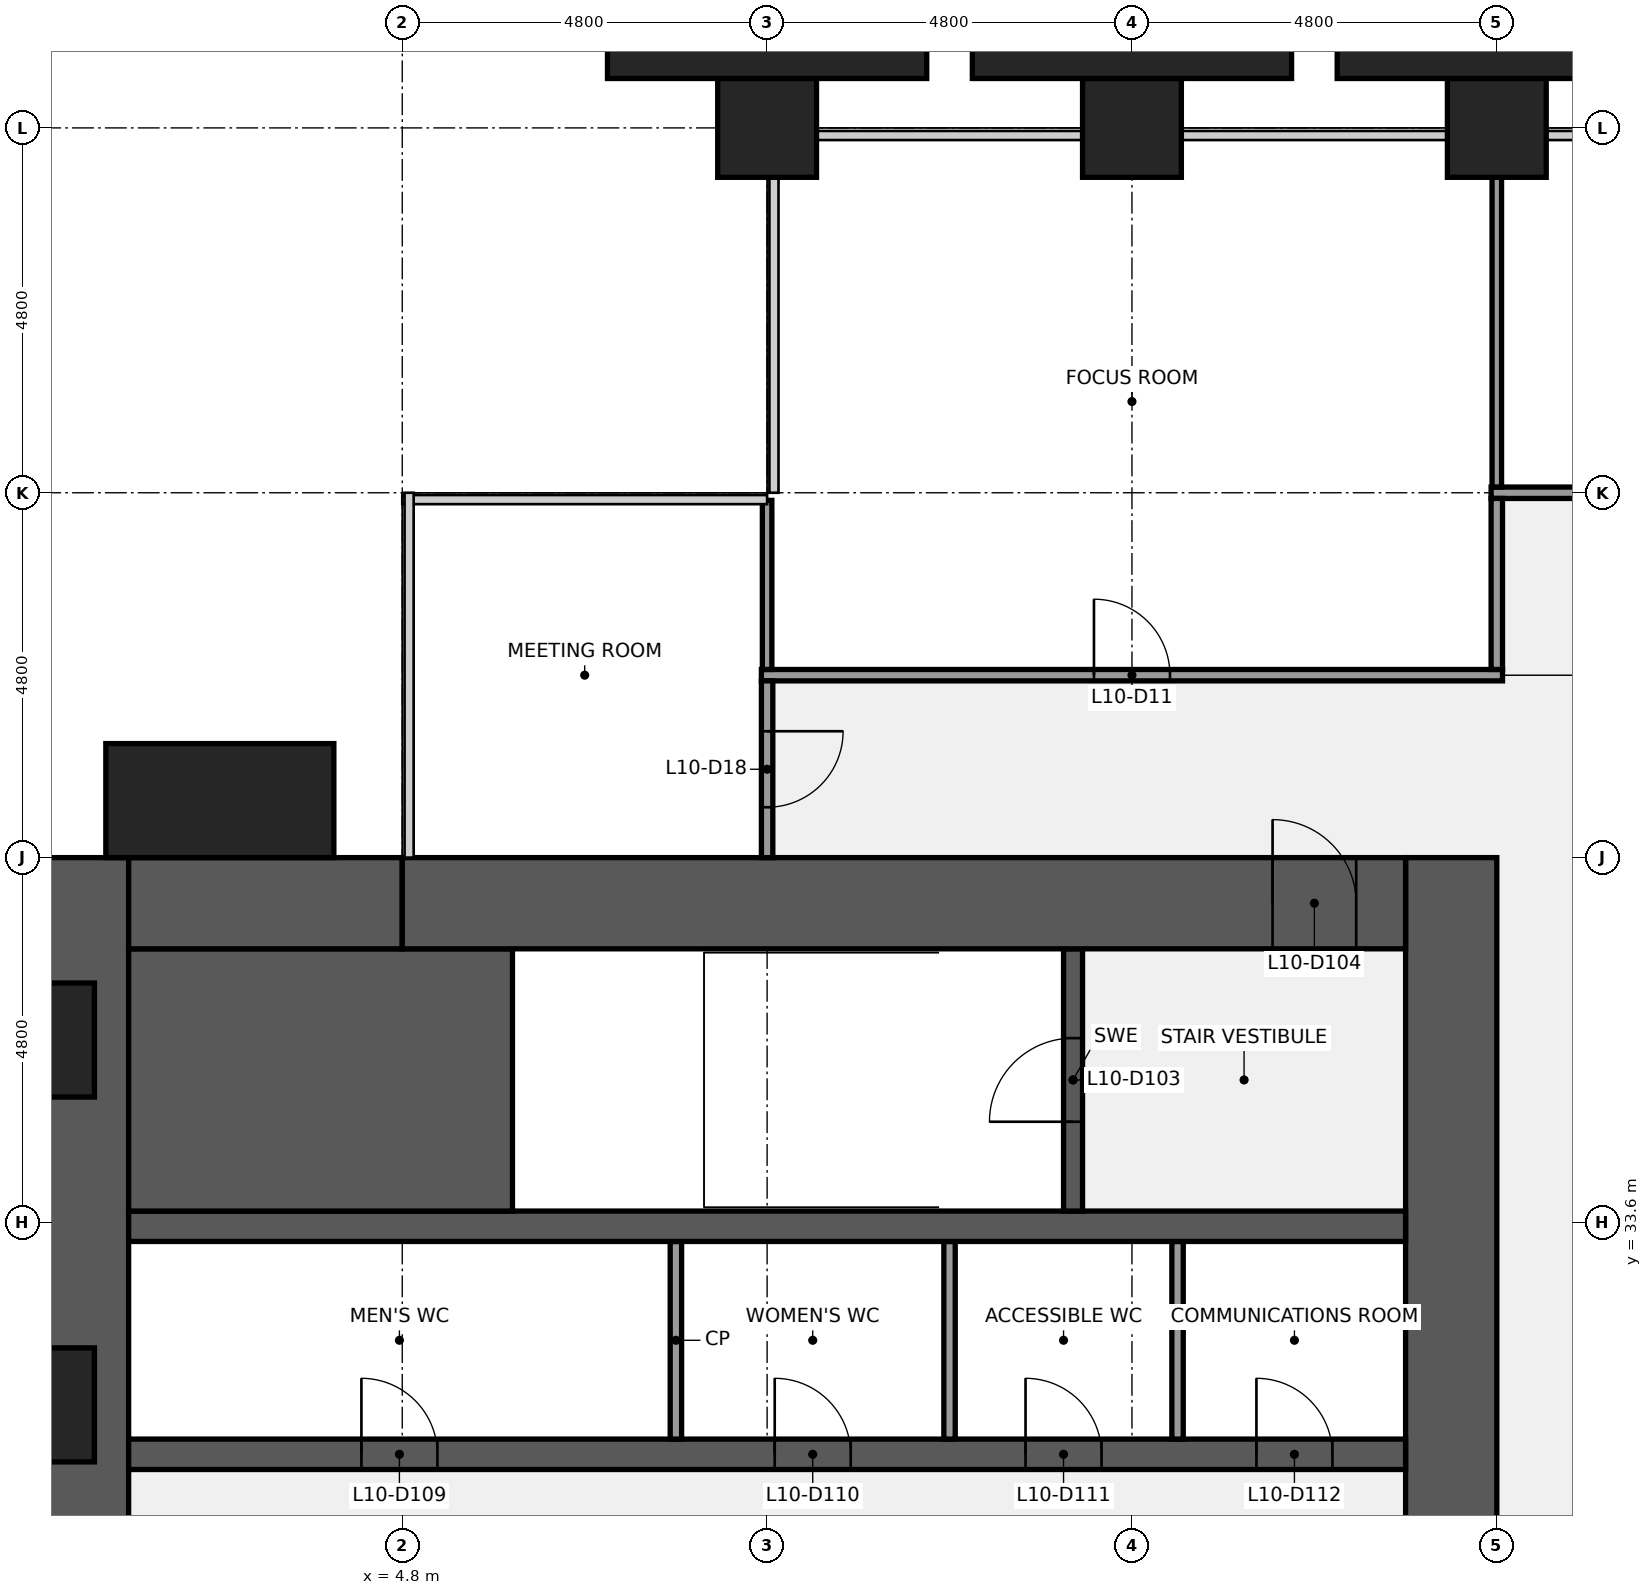
"""IFC4 building model, lengths in metres.
Left out: names, types, materials, properties, quantities, classifications, styles, units other than length and angle.
Written with IfcOpenShell. Run it as: python <this file> out.ifc"""

import sys

from ifc_helpers import new_model, si_unit, direction, frame, frame_2d, origin, origin_2d, place, context, subcontext, project, spatial, rectangle, extrude, element, fill, save


model = new_model("IFC4")
c1 = context("Model", 3, precision=1e-05, world=origin(), true_north=direction((0.0, 1.0)))
c2 = subcontext(c1, "Body", "Model", "MODEL_VIEW")
j1 = project(units=[si_unit("LENGTHUNIT", "METRE"), si_unit("PLANEANGLEUNIT", "RADIAN")], contexts=[c1])
p1 = place(None, origin())
s1 = spatial("IfcSite", under=j1, at=p1, CompositionType="ELEMENT")
p2 = place(p1, origin())
s2 = spatial("IfcBuilding", under=s1, at=p2, CompositionType="ELEMENT")
p3 = place(p2, frame((0.0, 0.0, 51.0)))
s3 = spatial("IfcBuildingStorey", under=s2, at=p3, CompositionType="ELEMENT", Elevation=51.0)
for number, where, z_axis, x_axis in (
    (1, (9.6, 48.0, 0.0), (0.0, 0.0, 1.0), (1.0, 0.0, 0.0)),
    (2, (14.4, 48.0, 0.0), (0.0, 0.0, 1.0), (1.0, 0.0, 0.0)),
    (3, (19.2, 48.0, 0.0), (0.0, 0.0, 1.0), (1.0, 0.0, 0.0)),
):
    element("IfcColumn", number, at=place(p3, frame(where, z_axis=z_axis, x_axis=x_axis)), inside=s3, PredefinedType="COLUMN", context=c2, shape_type="SweptSolid", body=[
        extrude(rectangle(XDim=1.3, YDim=1.3, at=origin_2d()), origin(), (0.0, 0.0, 1.0), 4.0),
    ])
p4 = place(p3, frame((0.6, 9.6, 0.0), z_axis=(0.0, 0.0, 1.0), x_axis=(0.0, 1.0, 0.0)))
e4 = element("IfcWall", 4, at=p4, inside=s3, PredefinedType="SHEAR", context=c2, shape_type="SweptSolid", body=[
    extrude(rectangle(XDim=28.8, YDim=1.2, at=frame_2d((14.4, 0.0))), origin(), (0.0, 0.0, 1.0), 3.84),
])
p5 = place(p4, frame((8.85, 0.0, 0.9)))
e5 = element("IfcOpeningElement", 5, at=p5, cuts=e4, PredefinedType="OPENING", context=c2, shape_type="SweptSolid", body=[
    extrude(rectangle(XDim=1.5, YDim=1.5, at=frame_2d((0.75, 0.75))), frame((0.0, 0.61, 0.0), z_axis=(0.0, -1.0, 0.0), x_axis=(1.0, 0.0, 0.0)), (0.0, 0.0, 1.0), 1.22),
])
p6 = place(p4, frame((18.45, 0.0, 0.9)))
e6 = element("IfcOpeningElement", 6, at=p6, cuts=e4, PredefinedType="OPENING", context=c2, shape_type="SweptSolid", body=[
    extrude(rectangle(XDim=1.5, YDim=1.5, at=frame_2d((0.75, 0.75))), frame((0.0, 0.61, 0.0), z_axis=(0.0, -1.0, 0.0), x_axis=(1.0, 0.0, 0.0)), (0.0, 0.0, 1.0), 1.22),
])
p7 = place(p3, frame((18.6, 38.4, 0.0), z_axis=(0.0, 0.0, 1.0), x_axis=(0.0, -1.0, 0.0)))
e7 = element("IfcWall", 7, at=p7, inside=s3, PredefinedType="SHEAR", context=c2, shape_type="SweptSolid", body=[
    extrude(rectangle(XDim=28.8, YDim=1.2, at=frame_2d((14.4, 0.0))), origin(), (0.0, 0.0, 1.0), 3.84),
])
p8 = place(p7, frame((18.3, 0.0, 0.0)))
e8 = element("IfcOpeningElement", 8, at=p8, cuts=e7, PredefinedType="OPENING", context=c2, shape_type="SweptSolid", body=[
    extrude(rectangle(XDim=1.8, YDim=2.1, at=frame_2d((0.9, 1.05))), frame((0.0, 0.61, 0.0), z_axis=(0.0, -1.0, 0.0), x_axis=(1.0, 0.0, 0.0)), (0.0, 0.0, 1.0), 1.22),
])
p9 = place(p7, frame((8.7, 0.0, 0.0)))
e9 = element("IfcOpeningElement", 9, at=p9, cuts=e7, PredefinedType="OPENING", context=c2, shape_type="SweptSolid", body=[
    extrude(rectangle(XDim=1.8, YDim=2.1, at=frame_2d((0.9, 1.05))), frame((0.0, 0.61, 0.0), z_axis=(0.0, -1.0, 0.0), x_axis=(1.0, 0.0, 0.0)), (0.0, 0.0, 1.0), 1.22),
])
p10 = place(p3, frame((1.2, 30.55, 0.0), z_axis=(0.0, 0.0, 1.0), x_axis=(1.0, 0.0, 0.0)))
e10 = element("IfcWall", 10, at=p10, inside=s3, PredefinedType="SHEAR", context=c2, shape_type="SweptSolid", body=[
    extrude(rectangle(XDim=16.8, YDim=0.4, at=frame_2d((8.4, 0.0))), origin(), (0.0, 0.0, 1.0), 3.84),
])
p11 = place(p10, frame((3.062, 0.0, 0.0)))
e11 = element("IfcOpeningElement", 11, at=p11, cuts=e10, PredefinedType="OPENING", context=c2, shape_type="SweptSolid", body=[
    extrude(rectangle(XDim=1.0, YDim=2.1, at=frame_2d((0.5, 1.05))), frame((0.0, 0.21, 0.0), z_axis=(0.0, -1.0, 0.0), x_axis=(1.0, 0.0, 0.0)), (0.0, 0.0, 1.0), 0.42),
])
p12 = place(p10, frame((8.5, 0.0, 0.0)))
e12 = element("IfcOpeningElement", 12, at=p12, cuts=e10, PredefinedType="OPENING", context=c2, shape_type="SweptSolid", body=[
    extrude(rectangle(XDim=1.0, YDim=2.1, at=frame_2d((0.5, 1.05))), frame((0.0, 0.21, 0.0), z_axis=(0.0, -1.0, 0.0), x_axis=(1.0, 0.0, 0.0)), (0.0, 0.0, 1.0), 0.42),
])
p13 = place(p10, frame((11.8, 0.0, 0.0)))
e13 = element("IfcOpeningElement", 13, at=p13, cuts=e10, PredefinedType="OPENING", context=c2, shape_type="SweptSolid", body=[
    extrude(rectangle(XDim=1.0, YDim=2.1, at=frame_2d((0.5, 1.05))), frame((0.0, 0.21, 0.0), z_axis=(0.0, -1.0, 0.0), x_axis=(1.0, 0.0, 0.0)), (0.0, 0.0, 1.0), 0.42),
])
p14 = place(p10, frame((14.837, 0.0, 0.0)))
e14 = element("IfcOpeningElement", 14, at=p14, cuts=e10, PredefinedType="OPENING", context=c2, shape_type="SweptSolid", body=[
    extrude(rectangle(XDim=1.0, YDim=2.1, at=frame_2d((0.5, 1.05))), frame((0.0, 0.21, 0.0), z_axis=(0.0, -1.0, 0.0), x_axis=(1.0, 0.0, 0.0)), (0.0, 0.0, 1.0), 0.42),
])
for number, where, z_axis, x_axis in (
    (15, (8.4, 30.75, 0.0), (0.0, 0.0, 1.0), (0.0, 1.0, 0.0)),
    (16, (12.0, 30.75, 0.0), (0.0, 0.0, 1.0), (0.0, 1.0, 0.0)),
    (17, (15.0, 30.75, 0.0), (0.0, 0.0, 1.0), (0.0, 1.0, 0.0)),
):
    element("IfcWall", number, at=place(p3, frame(where, z_axis=z_axis, x_axis=x_axis)), inside=s3, PredefinedType="PARTITIONING", context=c2, shape_type="SweptSolid", body=[
        extrude(rectangle(XDim=2.6, YDim=0.15, at=frame_2d((1.3, 0.0))), origin(), (0.0, 0.0, 1.0), 3.84),
    ])
p15 = place(p3, frame((1.2, 33.55, 0.0), z_axis=(0.0, 0.0, 1.0), x_axis=(1.0, 0.0, 0.0)))
e18 = element("IfcWall", 18, at=p15, inside=s3, PredefinedType="SHEAR", context=c2, shape_type="SweptSolid", body=[
    extrude(rectangle(XDim=16.8, YDim=0.4, at=frame_2d((8.4, 0.0))), origin(), (0.0, 0.0, 1.0), 3.84),
])
p16 = place(p3, frame((1.2, 35.475, 0.0), z_axis=(0.0, 0.0, 1.0), x_axis=(1.0, 0.0, 0.0)))
e19 = element("IfcWall", 19, at=p16, inside=s3, PredefinedType="SHEAR", context=c2, shape_type="SweptSolid", body=[
    extrude(rectangle(XDim=5.05, YDim=3.45, at=frame_2d((2.525, 0.0))), origin(), (0.0, 0.0, 1.0), 3.84),
])
p17 = place(p3, frame((13.625, 33.75, 0.0), z_axis=(0.0, 0.0, 1.0), x_axis=(0.0, 1.0, 0.0)))
e20 = element("IfcWall", 20, at=p17, inside=s3, PredefinedType="SHEAR", context=c2, shape_type="SweptSolid", body=[
    extrude(rectangle(XDim=3.45, YDim=0.25, at=frame_2d((1.725, 0.0))), origin(), (0.0, 0.0, 1.0), 3.84),
])
p18 = place(p17, frame((1.175, 0.0, 0.0)))
e21 = element("IfcOpeningElement", 21, at=p18, cuts=e20, PredefinedType="OPENING", context=c2, shape_type="SweptSolid", body=[
    extrude(rectangle(XDim=1.1, YDim=2.1, at=frame_2d((0.55, 1.05))), frame((0.0, 0.135, 0.0), z_axis=(0.0, -1.0, 0.0), x_axis=(1.0, 0.0, 0.0)), (0.0, 0.0, 1.0), 0.27),
])
p19 = place(p3, frame((1.2, 37.8, 0.0), z_axis=(0.0, 0.0, 1.0), x_axis=(1.0, 0.0, 0.0)))
e22 = element("IfcWall", 22, at=p19, inside=s3, PredefinedType="SHEAR", context=c2, shape_type="SweptSolid", body=[
    extrude(rectangle(XDim=3.6, YDim=1.2, at=frame_2d((1.8, 0.0))), origin(), (0.0, 0.0, 1.0), 3.84),
])
p20 = place(p3, frame((4.8, 37.8, 0.0), z_axis=(0.0, 0.0, 1.0), x_axis=(1.0, 0.0, 0.0)))
e23 = element("IfcWall", 23, at=p20, inside=s3, PredefinedType="SHEAR", context=c2, shape_type="SweptSolid", body=[
    extrude(rectangle(XDim=13.2, YDim=1.2, at=frame_2d((6.6, 0.0))), origin(), (0.0, 0.0, 1.0), 3.84),
])
p21 = place(p20, frame((11.45, 0.0, 0.0)))
e24 = element("IfcOpeningElement", 24, at=p21, cuts=e23, PredefinedType="OPENING", context=c2, shape_type="SweptSolid", body=[
    extrude(rectangle(XDim=1.1, YDim=2.1, at=frame_2d((0.55, 1.05))), frame((0.0, 0.61, 0.0), z_axis=(0.0, -1.0, 0.0), x_axis=(1.0, 0.0, 0.0)), (0.0, 0.0, 1.0), 1.22),
])
p22 = place(p3, frame((9.525, 40.8, 0.0), z_axis=(0.0, 0.0, 1.0), x_axis=(1.0, 0.0, 0.0)))
e25 = element("IfcWall", 25, at=p22, inside=s3, PredefinedType="PARTITIONING", context=c2, shape_type="SweptSolid", body=[
    extrude(rectangle(XDim=9.75, YDim=0.15, at=frame_2d((4.875, 0.0))), origin(), (0.0, 0.0, 1.0), 2.87),
])
p23 = place(p22, frame((4.375, 0.0, 0.0)))
e26 = element("IfcOpeningElement", 26, at=p23, cuts=e25, PredefinedType="OPENING", context=c2, shape_type="SweptSolid", body=[
    extrude(rectangle(XDim=1.0, YDim=2.1, at=frame_2d((0.5, 1.05))), frame((0.0, 0.085, 0.0), z_axis=(0.0, -1.0, 0.0), x_axis=(1.0, 0.0, 0.0)), (0.0, 0.0, 1.0), 0.17),
])
p24 = place(p3, frame((19.125, 43.2, 0.0), z_axis=(0.0, 0.0, 1.0), x_axis=(1.0, 0.0, 0.0)))
e27 = element("IfcWall", 27, at=p24, inside=s3, PredefinedType="PARTITIONING", context=c2, shape_type="SweptSolid", body=[
    extrude(rectangle(XDim=19.35, YDim=0.15, at=frame_2d((9.675, 0.0))), origin(), (0.0, 0.0, 1.0), 2.87),
])
p25 = place(p24, frame((4.375, 0.0, 0.0)))
e28 = element("IfcOpeningElement", 28, at=p25, cuts=e27, PredefinedType="OPENING", context=c2, shape_type="SweptSolid", body=[
    extrude(rectangle(XDim=1.0, YDim=2.1, at=frame_2d((0.5, 1.05))), frame((0.0, 0.085, 0.0), z_axis=(0.0, -1.0, 0.0), x_axis=(1.0, 0.0, 0.0)), (0.0, 0.0, 1.0), 0.17),
])
p26 = place(p24, frame((13.975, 0.0, 0.0)))
e29 = element("IfcOpeningElement", 29, at=p26, cuts=e27, PredefinedType="OPENING", context=c2, shape_type="SweptSolid", body=[
    extrude(rectangle(XDim=1.0, YDim=2.1, at=frame_2d((0.5, 1.05))), frame((0.0, 0.085, 0.0), z_axis=(0.0, -1.0, 0.0), x_axis=(1.0, 0.0, 0.0)), (0.0, 0.0, 1.0), 0.17),
])
p27 = place(p3, frame((9.6, 40.875, 0.0), z_axis=(0.0, 0.0, 1.0), x_axis=(0.0, 1.0, 0.0)))
e30 = element("IfcWall", 30, at=p27, inside=s3, PredefinedType="PARTITIONING", context=c2, shape_type="SweptSolid", body=[
    extrude(rectangle(XDim=2.225, YDim=0.125, at=frame_2d((1.113, 0.0))), origin(), (0.0, 0.0, 1.0), 2.87),
])
p28 = place(p3, frame((9.6, 38.4, 0.0), z_axis=(0.0, 0.0, 1.0), x_axis=(0.0, 1.0, 0.0)))
e31 = element("IfcWall", 31, at=p28, inside=s3, PredefinedType="PARTITIONING", context=c2, shape_type="SweptSolid", body=[
    extrude(rectangle(XDim=2.325, YDim=0.15, at=frame_2d((1.163, 0.0))), origin(), (0.0, 0.0, 1.0), 2.87),
])
p29 = place(p28, frame((0.663, 0.0, 0.0)))
e32 = element("IfcOpeningElement", 32, at=p29, cuts=e31, PredefinedType="OPENING", context=c2, shape_type="SweptSolid", body=[
    extrude(rectangle(XDim=1.0, YDim=2.1, at=frame_2d((0.5, 1.05))), frame((0.0, 0.085, 0.0), z_axis=(0.0, -1.0, 0.0), x_axis=(1.0, 0.0, 0.0)), (0.0, 0.0, 1.0), 0.17),
])
p30 = place(p3, frame((19.2, 43.275, 0.0), z_axis=(0.0, 0.0, 1.0), x_axis=(0.0, 1.0, 0.0)))
e33 = element("IfcWall", 33, at=p30, inside=s3, PredefinedType="PARTITIONING", context=c2, shape_type="SweptSolid", body=[
    extrude(rectangle(XDim=4.075, YDim=0.125, at=frame_2d((2.038, 0.0))), origin(), (0.0, 0.0, 1.0), 2.87),
])
p31 = place(p3, frame((19.2, 40.875, 0.0), z_axis=(0.0, 0.0, 1.0), x_axis=(0.0, 1.0, 0.0)))
e34 = element("IfcWall", 34, at=p31, inside=s3, PredefinedType="PARTITIONING", context=c2, shape_type="SweptSolid", body=[
    extrude(rectangle(XDim=2.25, YDim=0.15, at=frame_2d((1.125, 0.0))), origin(), (0.0, 0.0, 1.0), 2.87),
])
p32 = place(p3, frame((2.4, 39.15, 0.0), z_axis=(0.0, 0.0, 1.0), x_axis=(1.0, 0.0, 0.0)))
e35 = element("IfcColumn", 35, at=p32, inside=s3, PredefinedType="PILASTER", context=c2, shape_type="SweptSolid", body=[
    extrude(rectangle(XDim=3.0, YDim=1.5, at=origin_2d()), origin(), (0.0, 0.0, 1.0), 4.0),
])
for number, where, z_axis, x_axis in (
    (36, (9.6, 49.075, 0.0), (0.0, 0.0, 1.0), (1.0, 0.0, 0.0)),
    (37, (14.4, 49.075, 0.0), (0.0, 0.0, 1.0), (1.0, 0.0, 0.0)),
    (38, (19.2, 49.075, 0.0), (0.0, 0.0, 1.0), (1.0, 0.0, 0.0)),
):
    element("IfcColumn", number, at=place(p3, frame(where, z_axis=z_axis, x_axis=x_axis)), inside=s3, PredefinedType="PILASTER", context=c2, shape_type="SweptSolid", body=[
        extrude(rectangle(XDim=4.2, YDim=0.85, at=origin_2d()), origin(), (0.0, 0.0, 1.0), 4.0),
    ])
p33 = place(p18, origin())
e39 = element("IfcDoor", 39, at=p33, inside=s3, OperationType="SINGLE_SWING_LEFT", PredefinedType="DOOR", context=c2, shape_type="SweptSolid", body=[
    extrude(rectangle(XDim=1.1, YDim=2.1, at=frame_2d((0.55, 1.05))), frame((0.0, 0.025, 0.0), z_axis=(0.0, -1.0, 0.0), x_axis=(1.0, 0.0, 0.0)), (0.0, 0.0, 1.0), 0.05),
])
fill(e21, e39)
p34 = place(p21, origin())
e40 = element("IfcDoor", 40, at=p34, inside=s3, OperationType="SINGLE_SWING_LEFT", PredefinedType="DOOR", context=c2, shape_type="SweptSolid", body=[
    extrude(rectangle(XDim=1.1, YDim=2.1, at=frame_2d((0.55, 1.05))), frame((0.0, 0.025, 0.0), z_axis=(0.0, -1.0, 0.0), x_axis=(1.0, 0.0, 0.0)), (0.0, 0.0, 1.0), 0.05),
])
fill(e24, e40)
p35 = place(p11, origin())
e41 = element("IfcDoor", 41, at=p35, inside=s3, OperationType="SINGLE_SWING_LEFT", PredefinedType="DOOR", context=c2, shape_type="SweptSolid", body=[
    extrude(rectangle(XDim=1.0, YDim=2.1, at=frame_2d((0.5, 1.05))), frame((0.0, 0.025, 0.0), z_axis=(0.0, -1.0, 0.0), x_axis=(1.0, 0.0, 0.0)), (0.0, 0.0, 1.0), 0.05),
])
fill(e11, e41)
p36 = place(p12, origin())
e42 = element("IfcDoor", 42, at=p36, inside=s3, OperationType="SINGLE_SWING_LEFT", PredefinedType="DOOR", context=c2, shape_type="SweptSolid", body=[
    extrude(rectangle(XDim=1.0, YDim=2.1, at=frame_2d((0.5, 1.05))), frame((0.0, 0.025, 0.0), z_axis=(0.0, -1.0, 0.0), x_axis=(1.0, 0.0, 0.0)), (0.0, 0.0, 1.0), 0.05),
])
fill(e12, e42)
p37 = place(p13, origin())
e43 = element("IfcDoor", 43, at=p37, inside=s3, OperationType="SINGLE_SWING_LEFT", PredefinedType="DOOR", context=c2, shape_type="SweptSolid", body=[
    extrude(rectangle(XDim=1.0, YDim=2.1, at=frame_2d((0.5, 1.05))), frame((0.0, 0.025, 0.0), z_axis=(0.0, -1.0, 0.0), x_axis=(1.0, 0.0, 0.0)), (0.0, 0.0, 1.0), 0.05),
])
fill(e13, e43)
p38 = place(p14, origin())
e44 = element("IfcDoor", 44, at=p38, inside=s3, OperationType="SINGLE_SWING_LEFT", PredefinedType="DOOR", context=c2, shape_type="SweptSolid", body=[
    extrude(rectangle(XDim=1.0, YDim=2.1, at=frame_2d((0.5, 1.05))), frame((0.0, 0.025, 0.0), z_axis=(0.0, -1.0, 0.0), x_axis=(1.0, 0.0, 0.0)), (0.0, 0.0, 1.0), 0.05),
])
fill(e14, e44)
p39 = place(p23, origin())
e45 = element("IfcDoor", 45, at=p39, inside=s3, OperationType="SINGLE_SWING_LEFT", PredefinedType="DOOR", context=c2, shape_type="SweptSolid", body=[
    extrude(rectangle(XDim=1.0, YDim=2.1, at=frame_2d((0.5, 1.05))), frame((0.0, 0.025, 0.0), z_axis=(0.0, -1.0, 0.0), x_axis=(1.0, 0.0, 0.0)), (0.0, 0.0, 1.0), 0.05),
])
fill(e26, e45)
p40 = place(p29, origin())
e46 = element("IfcDoor", 46, at=p40, inside=s3, OperationType="SINGLE_SWING_RIGHT", PredefinedType="DOOR", context=c2, shape_type="SweptSolid", body=[
    extrude(rectangle(XDim=1.0, YDim=2.1, at=frame_2d((0.5, 1.05))), frame((0.0, 0.025, 0.0), z_axis=(0.0, -1.0, 0.0), x_axis=(1.0, 0.0, 0.0)), (0.0, 0.0, 1.0), 0.05),
])
fill(e32, e46)
save(model, sys.argv[1])
